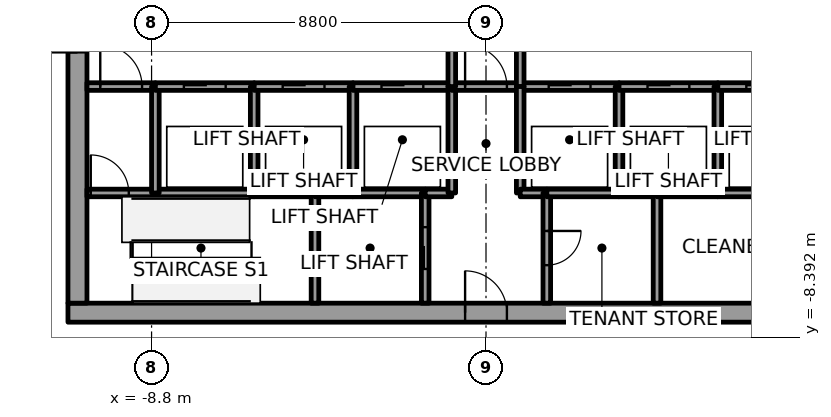
"""IFC4 building model, lengths in metres.
Left out: names, types, materials, properties, quantities, classifications, styles, units other than length and angle.
Written with IfcOpenShell. Run it as: python <this file> out.ifc"""

import sys

from ifc_helpers import new_model, si_unit, direction, frame, frame_2d, origin, place, context, subcontext, project, spatial, rectangle, extrude, element, fill, save


model = new_model("IFC4")
c1 = context("Model", 3, precision=1e-05, world=origin(), true_north=direction((0.0, 1.0)))
c2 = subcontext(c1, "Body", "Model", "MODEL_VIEW")
j1 = project(units=[si_unit("LENGTHUNIT", "METRE"), si_unit("PLANEANGLEUNIT", "RADIAN")], contexts=[c1])
p1 = place(None, origin())
s1 = spatial("IfcSite", under=j1, at=p1, CompositionType="ELEMENT")
p2 = place(p1, origin())
s2 = spatial("IfcBuilding", under=s1, at=p2, CompositionType="ELEMENT")
p3 = place(p2, frame((0.0, 0.0, 197.8)))
s3 = spatial("IfcBuildingStorey", under=s2, at=p3, CompositionType="ELEMENT", Elevation=197.8)
p4 = place(p3, frame((-11.0, -7.75, 0.0), z_axis=(0.0, 0.0, 1.0), x_axis=(1.0, 0.0, 0.0)))
e1 = element("IfcWall", 1, at=p4, inside=s3, PredefinedType="SHEAR", context=c2, shape_type="SweptSolid", body=[
    extrude(rectangle(XDim=22.0, YDim=0.5, at=frame_2d((11.0, 0.0))), origin(), (0.0, 0.0, 1.0), 4.0),
])
p5 = place(p4, frame((10.45, 0.0, 0.0)))
e2 = element("IfcOpeningElement", 2, at=p5, cuts=e1, PredefinedType="OPENING", context=c2, shape_type="SweptSolid", body=[
    extrude(rectangle(XDim=1.1, YDim=2.1, at=frame_2d((0.55, 1.05))), frame((0.0, 0.25, 0.0), z_axis=(0.0, -1.0, 0.0), x_axis=(1.0, 0.0, 0.0)), (0.0, 0.0, 1.0), 0.5),
])
p6 = place(p3, frame((-10.75, -7.5, 0.0), z_axis=(0.0, 0.0, 1.0), x_axis=(0.0, 1.0, 0.0)))
e3 = element("IfcWall", 3, at=p6, inside=s3, PredefinedType="SHEAR", context=c2, shape_type="SweptSolid", body=[
    extrude(rectangle(XDim=15.0, YDim=0.5, at=frame_2d((7.5, 0.0))), origin(), (0.0, 0.0, 1.0), 4.0),
])
p7 = place(p6, frame((6.6, 0.0, 0.0)))
e4 = element("IfcOpeningElement", 4, at=p7, cuts=e3, PredefinedType="OPENING", context=c2, shape_type="SweptSolid", body=[
    extrude(rectangle(XDim=1.8, YDim=2.1, at=frame_2d((0.9, 1.05))), frame((0.0, 0.25, 0.0), z_axis=(0.0, -1.0, 0.0), x_axis=(1.0, 0.0, 0.0)), (0.0, 0.0, 1.0), 0.5),
])
p8 = place(p3, frame((-10.5, -4.6, 0.0), z_axis=(0.0, 0.0, 1.0), x_axis=(1.0, 0.0, 0.0)))
e5 = element("IfcWall", 5, at=p8, inside=s3, PredefinedType="SOLIDWALL", context=c2, shape_type="SweptSolid", body=[
    extrude(rectangle(XDim=1.8, YDim=0.2, at=frame_2d((0.9, 0.0))), origin(), (0.0, 0.0, 1.0), 3.85),
])
p9 = place(p8, frame((0.1, 0.0, 0.0)))
e6 = element("IfcOpeningElement", 6, at=p9, cuts=e5, PredefinedType="OPENING", context=c2, shape_type="SweptSolid", body=[
    extrude(rectangle(XDim=1.0, YDim=2.1, at=frame_2d((0.5, 1.05))), frame((0.0, 0.1, 0.0), z_axis=(0.0, -1.0, 0.0), x_axis=(1.0, 0.0, 0.0)), (0.0, 0.0, 1.0), 0.2),
])
p10 = place(p3, frame((-10.5, -1.8, 0.0), z_axis=(0.0, 0.0, 1.0), x_axis=(1.0, 0.0, 0.0)))
e7 = element("IfcWall", 7, at=p10, inside=s3, PredefinedType="SOLIDWALL", context=c2, shape_type="SweptSolid", body=[
    extrude(rectangle(XDim=1.8, YDim=0.2, at=frame_2d((0.9, 0.0))), origin(), (0.0, 0.0, 1.0), 3.85),
])
p11 = place(p10, frame((0.35, 0.0, 0.0)))
e8 = element("IfcOpeningElement", 8, at=p11, cuts=e7, PredefinedType="OPENING", context=c2, shape_type="SweptSolid", body=[
    extrude(rectangle(XDim=1.1, YDim=2.1, at=frame_2d((0.55, 1.05))), frame((0.0, 0.1, 0.0), z_axis=(0.0, -1.0, 0.0), x_axis=(1.0, 0.0, 0.0)), (0.0, 0.0, 1.0), 0.2),
])
p12 = place(p3, frame((-8.7, -4.6, 0.0), z_axis=(0.0, 0.0, 1.0), x_axis=(1.0, 0.0, 0.0)))
e9 = element("IfcWall", 9, at=p12, inside=s3, PredefinedType="SOLIDWALL", context=c2, shape_type="SweptSolid", body=[
    extrude(rectangle(XDim=2.6, YDim=0.2, at=frame_2d((1.3, 0.0))), origin(), (0.0, 0.0, 1.0), 3.85),
])
p13 = place(p3, frame((-8.7, -4.6, 0.0), z_axis=(0.0, 0.0, 1.0), x_axis=(0.0, 1.0, 0.0)))
e10 = element("IfcWall", 10, at=p13, inside=s3, PredefinedType="SOLIDWALL", context=c2, shape_type="SweptSolid", body=[
    extrude(rectangle(XDim=2.8, YDim=0.2, at=frame_2d((1.4, 0.0))), origin(), (0.0, 0.0, 1.0), 3.85),
])
p14 = place(p3, frame((-8.7, -1.8, 0.0), z_axis=(0.0, 0.0, 1.0), x_axis=(1.0, 0.0, 0.0)))
e11 = element("IfcWall", 11, at=p14, inside=s3, PredefinedType="SOLIDWALL", context=c2, shape_type="SweptSolid", body=[
    extrude(rectangle(XDim=2.6, YDim=0.2, at=frame_2d((1.3, 0.0))), origin(), (0.0, 0.0, 1.0), 3.85),
])
p15 = place(p14, frame((0.75, 0.0, 0.0)))
e12 = element("IfcOpeningElement", 12, at=p15, cuts=e11, PredefinedType="OPENING", context=c2, shape_type="SweptSolid", body=[
    extrude(rectangle(XDim=1.1, YDim=2.1, at=frame_2d((0.55, 1.05))), frame((0.0, 0.1, 0.0), z_axis=(0.0, -1.0, 0.0), x_axis=(1.0, 0.0, 0.0)), (0.0, 0.0, 1.0), 0.2),
])
p16 = place(p3, frame((-6.1, -4.6, 0.0), z_axis=(0.0, 0.0, 1.0), x_axis=(1.0, 0.0, 0.0)))
e13 = element("IfcWall", 13, at=p16, inside=s3, PredefinedType="SOLIDWALL", context=c2, shape_type="SweptSolid", body=[
    extrude(rectangle(XDim=1.6, YDim=0.2, at=frame_2d((0.8, 0.0))), origin(), (0.0, 0.0, 1.0), 3.85),
])
p17 = place(p3, frame((-6.1, -4.6, 0.0), z_axis=(0.0, 0.0, 1.0), x_axis=(0.0, 1.0, 0.0)))
e14 = element("IfcWall", 14, at=p17, inside=s3, PredefinedType="SOLIDWALL", context=c2, shape_type="SweptSolid", body=[
    extrude(rectangle(XDim=2.8, YDim=0.2, at=frame_2d((1.4, 0.0))), origin(), (0.0, 0.0, 1.0), 3.85),
])
p18 = place(p3, frame((-6.1, -1.8, 0.0), z_axis=(0.0, 0.0, 1.0), x_axis=(1.0, 0.0, 0.0)))
e15 = element("IfcWall", 15, at=p18, inside=s3, PredefinedType="SOLIDWALL", context=c2, shape_type="SweptSolid", body=[
    extrude(rectangle(XDim=2.6, YDim=0.2, at=frame_2d((1.3, 0.0))), origin(), (0.0, 0.0, 1.0), 3.85),
])
p19 = place(p18, frame((0.75, 0.0, 0.0)))
e16 = element("IfcOpeningElement", 16, at=p19, cuts=e15, PredefinedType="OPENING", context=c2, shape_type="SweptSolid", body=[
    extrude(rectangle(XDim=1.1, YDim=2.1, at=frame_2d((0.55, 1.05))), frame((0.0, 0.1, 0.0), z_axis=(0.0, -1.0, 0.0), x_axis=(1.0, 0.0, 0.0)), (0.0, 0.0, 1.0), 0.2),
])
p20 = place(p3, frame((-4.5, -4.6, 0.0), z_axis=(0.0, 0.0, 1.0), x_axis=(0.0, -1.0, 0.0)))
e17 = element("IfcWall", 17, at=p20, inside=s3, PredefinedType="SOLIDWALL", context=c2, shape_type="SweptSolid", body=[
    extrude(rectangle(XDim=2.9, YDim=0.2, at=frame_2d((1.45, 0.0))), origin(), (0.0, 0.0, 1.0), 3.85),
])
p21 = place(p3, frame((-4.5, -4.6, 0.0), z_axis=(0.0, 0.0, 1.0), x_axis=(1.0, 0.0, 0.0)))
e18 = element("IfcWall", 18, at=p21, inside=s3, PredefinedType="SOLIDWALL", context=c2, shape_type="SweptSolid", body=[
    extrude(rectangle(XDim=1.0, YDim=0.2, at=frame_2d((0.5, 0.0))), origin(), (0.0, 0.0, 1.0), 3.85),
])
p22 = place(p3, frame((-3.5, -4.6, 0.0), z_axis=(0.0, 0.0, 1.0), x_axis=(1.0, 0.0, 0.0)))
e19 = element("IfcWall", 19, at=p22, inside=s3, PredefinedType="SOLIDWALL", context=c2, shape_type="SweptSolid", body=[
    extrude(rectangle(XDim=1.9, YDim=0.2, at=frame_2d((0.95, 0.0))), origin(), (0.0, 0.0, 1.0), 3.85),
])
p23 = place(p3, frame((-3.5, -4.6, 0.0), z_axis=(0.0, 0.0, 1.0), x_axis=(0.0, 1.0, 0.0)))
e20 = element("IfcWall", 20, at=p23, inside=s3, PredefinedType="SOLIDWALL", context=c2, shape_type="SweptSolid", body=[
    extrude(rectangle(XDim=2.8, YDim=0.2, at=frame_2d((1.4, 0.0))), origin(), (0.0, 0.0, 1.0), 3.85),
])
p24 = place(p3, frame((-3.5, -1.8, 0.0), z_axis=(0.0, 0.0, 1.0), x_axis=(1.0, 0.0, 0.0)))
e21 = element("IfcWall", 21, at=p24, inside=s3, PredefinedType="SOLIDWALL", context=c2, shape_type="SweptSolid", body=[
    extrude(rectangle(XDim=2.6, YDim=0.2, at=frame_2d((1.3, 0.0))), origin(), (0.0, 0.0, 1.0), 3.85),
])
p25 = place(p24, frame((0.75, 0.0, 0.0)))
e22 = element("IfcOpeningElement", 22, at=p25, cuts=e21, PredefinedType="OPENING", context=c2, shape_type="SweptSolid", body=[
    extrude(rectangle(XDim=1.1, YDim=2.1, at=frame_2d((0.55, 1.05))), frame((0.0, 0.1, 0.0), z_axis=(0.0, -1.0, 0.0), x_axis=(1.0, 0.0, 0.0)), (0.0, 0.0, 1.0), 0.2),
])
p26 = place(p3, frame((-1.6, -7.5, 0.0), z_axis=(0.0, 0.0, 1.0), x_axis=(0.0, 1.0, 0.0)))
e23 = element("IfcWall", 23, at=p26, inside=s3, PredefinedType="SOLIDWALL", context=c2, shape_type="SweptSolid", body=[
    extrude(rectangle(XDim=2.9, YDim=0.2, at=frame_2d((1.45, 0.0))), origin(), (0.0, 0.0, 1.0), 3.85),
])
p27 = place(p26, frame((0.9, 0.0, 0.0)))
e24 = element("IfcOpeningElement", 24, at=p27, cuts=e23, PredefinedType="OPENING", context=c2, shape_type="SweptSolid", body=[
    extrude(rectangle(XDim=1.1, YDim=2.1, at=frame_2d((0.55, 1.05))), frame((0.0, 0.1, 0.0), z_axis=(0.0, -1.0, 0.0), x_axis=(1.0, 0.0, 0.0)), (0.0, 0.0, 1.0), 0.2),
])
p28 = place(p3, frame((-1.6, -4.6, 0.0), z_axis=(0.0, 0.0, 1.0), x_axis=(1.0, 0.0, 0.0)))
e25 = element("IfcWall", 25, at=p28, inside=s3, PredefinedType="SOLIDWALL", context=c2, shape_type="SweptSolid", body=[
    extrude(rectangle(XDim=0.7, YDim=0.2, at=frame_2d((0.35, 0.0))), origin(), (0.0, 0.0, 1.0), 3.85),
])
p29 = place(p3, frame((-0.9, -4.6, 0.0), z_axis=(0.0, 0.0, 1.0), x_axis=(0.0, 1.0, 0.0)))
e26 = element("IfcWall", 26, at=p29, inside=s3, PredefinedType="SOLIDWALL", context=c2, shape_type="SweptSolid", body=[
    extrude(rectangle(XDim=2.8, YDim=0.2, at=frame_2d((1.4, 0.0))), origin(), (0.0, 0.0, 1.0), 3.85),
])
p30 = place(p3, frame((-0.9, -1.8, 0.0), z_axis=(0.0, 0.0, 1.0), x_axis=(1.0, 0.0, 0.0)))
e27 = element("IfcWall", 27, at=p30, inside=s3, PredefinedType="SOLIDWALL", context=c2, shape_type="SweptSolid", body=[
    extrude(rectangle(XDim=1.8, YDim=0.2, at=frame_2d((0.9, 0.0))), origin(), (0.0, 0.0, 1.0), 3.85),
])
p31 = place(p30, frame((0.35, 0.0, 0.0)))
e28 = element("IfcOpeningElement", 28, at=p31, cuts=e27, PredefinedType="OPENING", context=c2, shape_type="SweptSolid", body=[
    extrude(rectangle(XDim=1.1, YDim=2.1, at=frame_2d((0.55, 1.05))), frame((0.0, 0.1, 0.0), z_axis=(0.0, -1.0, 0.0), x_axis=(1.0, 0.0, 0.0)), (0.0, 0.0, 1.0), 0.2),
])
p32 = place(p3, frame((-0.9, 1.8, 0.0), z_axis=(0.0, 0.0, 1.0), x_axis=(0.0, -1.0, 0.0)))
e29 = element("IfcWall", 29, at=p32, inside=s3, PredefinedType="SOLIDWALL", context=c2, shape_type="SweptSolid", body=[
    extrude(rectangle(XDim=3.6, YDim=0.2, at=frame_2d((1.8, 0.0))), origin(), (0.0, 0.0, 1.0), 3.85),
])
p33 = place(p32, frame((1.05, 0.0, 0.0)))
e30 = element("IfcOpeningElement", 30, at=p33, cuts=e29, PredefinedType="OPENING", context=c2, shape_type="SweptSolid", body=[
    extrude(rectangle(XDim=1.5, YDim=2.1, at=frame_2d((0.75, 1.05))), frame((0.0, 0.1, 0.0), z_axis=(0.0, -1.0, 0.0), x_axis=(1.0, 0.0, 0.0)), (0.0, 0.0, 1.0), 0.2),
])
p34 = place(p3, frame((0.9, -1.8, 0.0), z_axis=(0.0, 0.0, 1.0), x_axis=(1.0, 0.0, 0.0)))
e31 = element("IfcWall", 31, at=p34, inside=s3, PredefinedType="SOLIDWALL", context=c2, shape_type="SweptSolid", body=[
    extrude(rectangle(XDim=2.6, YDim=0.2, at=frame_2d((1.3, 0.0))), origin(), (0.0, 0.0, 1.0), 3.85),
])
p35 = place(p34, frame((0.75, 0.0, 0.0)))
e32 = element("IfcOpeningElement", 32, at=p35, cuts=e31, PredefinedType="OPENING", context=c2, shape_type="SweptSolid", body=[
    extrude(rectangle(XDim=1.1, YDim=2.1, at=frame_2d((0.55, 1.05))), frame((0.0, 0.1, 0.0), z_axis=(0.0, -1.0, 0.0), x_axis=(1.0, 0.0, 0.0)), (0.0, 0.0, 1.0), 0.2),
])
p36 = place(p3, frame((0.9, -1.8, 0.0), z_axis=(0.0, 0.0, 1.0), x_axis=(0.0, 1.0, 0.0)))
e33 = element("IfcWall", 33, at=p36, inside=s3, PredefinedType="SOLIDWALL", context=c2, shape_type="SweptSolid", body=[
    extrude(rectangle(XDim=3.6, YDim=0.2, at=frame_2d((1.8, 0.0))), origin(), (0.0, 0.0, 1.0), 3.85),
])
p37 = place(p36, frame((1.05, 0.0, 0.0)))
e34 = element("IfcOpeningElement", 34, at=p37, cuts=e33, PredefinedType="OPENING", context=c2, shape_type="SweptSolid", body=[
    extrude(rectangle(XDim=1.5, YDim=2.1, at=frame_2d((0.75, 1.05))), frame((0.0, 0.1, 0.0), z_axis=(0.0, -1.0, 0.0), x_axis=(1.0, 0.0, 0.0)), (0.0, 0.0, 1.0), 0.2),
])
p38 = place(p3, frame((0.9, -1.8, 0.0), z_axis=(0.0, 0.0, 1.0), x_axis=(0.0, -1.0, 0.0)))
e35 = element("IfcWall", 35, at=p38, inside=s3, PredefinedType="SOLIDWALL", context=c2, shape_type="SweptSolid", body=[
    extrude(rectangle(XDim=2.8, YDim=0.2, at=frame_2d((1.4, 0.0))), origin(), (0.0, 0.0, 1.0), 3.85),
])
p39 = place(p3, frame((0.9, -4.6, 0.0), z_axis=(0.0, 0.0, 1.0), x_axis=(1.0, 0.0, 0.0)))
e36 = element("IfcWall", 36, at=p39, inside=s3, PredefinedType="SOLIDWALL", context=c2, shape_type="SweptSolid", body=[
    extrude(rectangle(XDim=0.7, YDim=0.2, at=frame_2d((0.35, 0.0))), origin(), (0.0, 0.0, 1.0), 3.85),
])
p40 = place(p3, frame((1.6, -4.6, 0.0), z_axis=(0.0, 0.0, 1.0), x_axis=(0.0, -1.0, 0.0)))
e37 = element("IfcWall", 37, at=p40, inside=s3, PredefinedType="SOLIDWALL", context=c2, shape_type="SweptSolid", body=[
    extrude(rectangle(XDim=2.9, YDim=0.2, at=frame_2d((1.45, 0.0))), origin(), (0.0, 0.0, 1.0), 3.85),
])
p41 = place(p40, frame((1.0, 0.0, 0.0)))
e38 = element("IfcOpeningElement", 38, at=p41, cuts=e37, PredefinedType="OPENING", context=c2, shape_type="SweptSolid", body=[
    extrude(rectangle(XDim=0.9, YDim=2.1, at=frame_2d((0.45, 1.05))), frame((0.0, 0.1, 0.0), z_axis=(0.0, -1.0, 0.0), x_axis=(1.0, 0.0, 0.0)), (0.0, 0.0, 1.0), 0.2),
])
p42 = place(p3, frame((3.5, -4.6, 0.0), z_axis=(0.0, 0.0, 1.0), x_axis=(-1.0, 0.0, 0.0)))
e39 = element("IfcWall", 39, at=p42, inside=s3, PredefinedType="SOLIDWALL", context=c2, shape_type="SweptSolid", body=[
    extrude(rectangle(XDim=1.9, YDim=0.2, at=frame_2d((0.95, 0.0))), origin(), (0.0, 0.0, 1.0), 3.85),
])
p43 = place(p3, frame((4.5, -4.6, 0.0), z_axis=(0.0, 0.0, 1.0), x_axis=(-1.0, 0.0, 0.0)))
e40 = element("IfcWall", 40, at=p43, inside=s3, PredefinedType="SOLIDWALL", context=c2, shape_type="SweptSolid", body=[
    extrude(rectangle(XDim=1.0, YDim=0.2, at=frame_2d((0.5, 0.0))), origin(), (0.0, 0.0, 1.0), 3.85),
])
p44 = place(p3, frame((3.5, -4.6, 0.0), z_axis=(0.0, 0.0, 1.0), x_axis=(0.0, 1.0, 0.0)))
e41 = element("IfcWall", 41, at=p44, inside=s3, PredefinedType="SOLIDWALL", context=c2, shape_type="SweptSolid", body=[
    extrude(rectangle(XDim=2.8, YDim=0.2, at=frame_2d((1.4, 0.0))), origin(), (0.0, 0.0, 1.0), 3.85),
])
p45 = place(p3, frame((3.5, -1.8, 0.0), z_axis=(0.0, 0.0, 1.0), x_axis=(1.0, 0.0, 0.0)))
e42 = element("IfcWall", 42, at=p45, inside=s3, PredefinedType="SOLIDWALL", context=c2, shape_type="SweptSolid", body=[
    extrude(rectangle(XDim=2.6, YDim=0.2, at=frame_2d((1.3, 0.0))), origin(), (0.0, 0.0, 1.0), 3.85),
])
p46 = place(p45, frame((0.75, 0.0, 0.0)))
e43 = element("IfcOpeningElement", 43, at=p46, cuts=e42, PredefinedType="OPENING", context=c2, shape_type="SweptSolid", body=[
    extrude(rectangle(XDim=1.1, YDim=2.1, at=frame_2d((0.55, 1.05))), frame((0.0, 0.1, 0.0), z_axis=(0.0, -1.0, 0.0), x_axis=(1.0, 0.0, 0.0)), (0.0, 0.0, 1.0), 0.2),
])
p47 = place(p3, frame((4.5, -4.6, 0.0), z_axis=(0.0, 0.0, 1.0), x_axis=(0.0, -1.0, 0.0)))
e44 = element("IfcWall", 44, at=p47, inside=s3, PredefinedType="SOLIDWALL", context=c2, shape_type="SweptSolid", body=[
    extrude(rectangle(XDim=2.9, YDim=0.2, at=frame_2d((1.45, 0.0))), origin(), (0.0, 0.0, 1.0), 3.85),
])
p48 = place(p3, frame((6.1, -4.6, 0.0), z_axis=(0.0, 0.0, 1.0), x_axis=(-1.0, 0.0, 0.0)))
e45 = element("IfcWall", 45, at=p48, inside=s3, PredefinedType="SOLIDWALL", context=c2, shape_type="SweptSolid", body=[
    extrude(rectangle(XDim=1.6, YDim=0.2, at=frame_2d((0.8, 0.0))), origin(), (0.0, 0.0, 1.0), 3.85),
])
p49 = place(p3, frame((8.7, -4.6, 0.0), z_axis=(0.0, 0.0, 1.0), x_axis=(-1.0, 0.0, 0.0)))
e46 = element("IfcWall", 46, at=p49, inside=s3, PredefinedType="SOLIDWALL", context=c2, shape_type="SweptSolid", body=[
    extrude(rectangle(XDim=2.6, YDim=0.2, at=frame_2d((1.3, 0.0))), origin(), (0.0, 0.0, 1.0), 3.85),
])
p50 = place(p3, frame((6.1, -4.6, 0.0), z_axis=(0.0, 0.0, 1.0), x_axis=(0.0, 1.0, 0.0)))
e47 = element("IfcWall", 47, at=p50, inside=s3, PredefinedType="SOLIDWALL", context=c2, shape_type="SweptSolid", body=[
    extrude(rectangle(XDim=2.8, YDim=0.2, at=frame_2d((1.4, 0.0))), origin(), (0.0, 0.0, 1.0), 3.85),
])
p51 = place(p3, frame((6.1, -1.8, 0.0), z_axis=(0.0, 0.0, 1.0), x_axis=(1.0, 0.0, 0.0)))
e48 = element("IfcWall", 48, at=p51, inside=s3, PredefinedType="SOLIDWALL", context=c2, shape_type="SweptSolid", body=[
    extrude(rectangle(XDim=2.6, YDim=0.2, at=frame_2d((1.3, 0.0))), origin(), (0.0, 0.0, 1.0), 3.85),
])
p52 = place(p51, frame((0.75, 0.0, 0.0)))
e49 = element("IfcOpeningElement", 49, at=p52, cuts=e48, PredefinedType="OPENING", context=c2, shape_type="SweptSolid", body=[
    extrude(rectangle(XDim=1.1, YDim=2.1, at=frame_2d((0.55, 1.05))), frame((0.0, 0.1, 0.0), z_axis=(0.0, -1.0, 0.0), x_axis=(1.0, 0.0, 0.0)), (0.0, 0.0, 1.0), 0.2),
])
p53 = place(p15, origin())
e50 = element("IfcDoor", 50, at=p53, inside=s3, OperationType="SLIDING_TO_RIGHT", PredefinedType="DOOR", context=c2, shape_type="SweptSolid", body=[
    extrude(rectangle(XDim=1.1, YDim=2.1, at=frame_2d((0.55, 1.05))), frame((0.0, 0.025, 0.0), z_axis=(0.0, -1.0, 0.0), x_axis=(1.0, 0.0, 0.0)), (0.0, 0.0, 1.0), 0.05),
])
fill(e12, e50)
p54 = place(p19, origin())
e51 = element("IfcDoor", 51, at=p54, inside=s3, OperationType="SLIDING_TO_LEFT", PredefinedType="DOOR", context=c2, shape_type="SweptSolid", body=[
    extrude(rectangle(XDim=1.1, YDim=2.1, at=frame_2d((0.55, 1.05))), frame((0.0, 0.025, 0.0), z_axis=(0.0, -1.0, 0.0), x_axis=(1.0, 0.0, 0.0)), (0.0, 0.0, 1.0), 0.05),
])
fill(e16, e51)
p55 = place(p25, origin())
e52 = element("IfcDoor", 52, at=p55, inside=s3, OperationType="SLIDING_TO_RIGHT", PredefinedType="DOOR", context=c2, shape_type="SweptSolid", body=[
    extrude(rectangle(XDim=1.1, YDim=2.1, at=frame_2d((0.55, 1.05))), frame((0.0, 0.025, 0.0), z_axis=(0.0, -1.0, 0.0), x_axis=(1.0, 0.0, 0.0)), (0.0, 0.0, 1.0), 0.05),
])
fill(e22, e52)
p56 = place(p35, origin())
e53 = element("IfcDoor", 53, at=p56, inside=s3, OperationType="SLIDING_TO_LEFT", PredefinedType="DOOR", context=c2, shape_type="SweptSolid", body=[
    extrude(rectangle(XDim=1.1, YDim=2.1, at=frame_2d((0.55, 1.05))), frame((0.0, 0.025, 0.0), z_axis=(0.0, -1.0, 0.0), x_axis=(1.0, 0.0, 0.0)), (0.0, 0.0, 1.0), 0.05),
])
fill(e32, e53)
p57 = place(p46, origin())
e54 = element("IfcDoor", 54, at=p57, inside=s3, OperationType="SLIDING_TO_LEFT", PredefinedType="DOOR", context=c2, shape_type="SweptSolid", body=[
    extrude(rectangle(XDim=1.1, YDim=2.1, at=frame_2d((0.55, 1.05))), frame((0.0, 0.025, 0.0), z_axis=(0.0, -1.0, 0.0), x_axis=(1.0, 0.0, 0.0)), (0.0, 0.0, 1.0), 0.05),
])
fill(e43, e54)
p58 = place(p52, origin())
e55 = element("IfcDoor", 55, at=p58, inside=s3, OperationType="SLIDING_TO_LEFT", PredefinedType="DOOR", context=c2, shape_type="SweptSolid", body=[
    extrude(rectangle(XDim=1.1, YDim=2.1, at=frame_2d((0.55, 1.05))), frame((0.0, 0.025, 0.0), z_axis=(0.0, -1.0, 0.0), x_axis=(1.0, 0.0, 0.0)), (0.0, 0.0, 1.0), 0.05),
])
fill(e49, e55)
p59 = place(p27, origin())
e56 = element("IfcDoor", 56, at=p59, inside=s3, OperationType="SLIDING_TO_LEFT", PredefinedType="DOOR", context=c2, shape_type="SweptSolid", body=[
    extrude(rectangle(XDim=1.1, YDim=2.1, at=frame_2d((0.55, 1.05))), frame((0.0, 0.025, 0.0), z_axis=(0.0, -1.0, 0.0), x_axis=(1.0, 0.0, 0.0)), (0.0, 0.0, 1.0), 0.05),
])
fill(e24, e56)
p60 = place(p11, origin())
e57 = element("IfcDoor", 57, at=p60, inside=s3, OperationType="SINGLE_SWING_RIGHT", PredefinedType="DOOR", context=c2, shape_type="SweptSolid", body=[
    extrude(rectangle(XDim=1.1, YDim=2.1, at=frame_2d((0.55, 1.05))), frame((0.0, 0.025, 0.0), z_axis=(0.0, -1.0, 0.0), x_axis=(1.0, 0.0, 0.0)), (0.0, 0.0, 1.0), 0.05),
])
fill(e8, e57)
p61 = place(p31, origin())
e58 = element("IfcDoor", 58, at=p61, inside=s3, OperationType="SINGLE_SWING_RIGHT", PredefinedType="DOOR", context=c2, shape_type="SweptSolid", body=[
    extrude(rectangle(XDim=1.1, YDim=2.1, at=frame_2d((0.55, 1.05))), frame((0.0, 0.025, 0.0), z_axis=(0.0, -1.0, 0.0), x_axis=(1.0, 0.0, 0.0)), (0.0, 0.0, 1.0), 0.05),
])
fill(e28, e58)
p62 = place(p9, origin())
e59 = element("IfcDoor", 59, at=p62, inside=s3, OperationType="SINGLE_SWING_LEFT", PredefinedType="DOOR", context=c2, shape_type="SweptSolid", body=[
    extrude(rectangle(XDim=1.0, YDim=2.1, at=frame_2d((0.5, 1.05))), frame((0.0, 0.025, 0.0), z_axis=(0.0, -1.0, 0.0), x_axis=(1.0, 0.0, 0.0)), (0.0, 0.0, 1.0), 0.05),
])
fill(e6, e59)
p63 = place(p41, origin())
e60 = element("IfcDoor", 60, at=p63, inside=s3, OperationType="SINGLE_SWING_LEFT", PredefinedType="DOOR", context=c2, shape_type="SweptSolid", body=[
    extrude(rectangle(XDim=0.9, YDim=2.1, at=frame_2d((0.45, 1.05))), frame((0.0, 0.025, 0.0), z_axis=(0.0, -1.0, 0.0), x_axis=(1.0, 0.0, 0.0)), (0.0, 0.0, 1.0), 0.05),
])
fill(e38, e60)
p64 = place(p7, origin())
e61 = element("IfcDoor", 61, at=p64, inside=s3, OperationType="DOUBLE_DOOR_SINGLE_SWING", PredefinedType="DOOR", context=c2, shape_type="SweptSolid", body=[
    extrude(rectangle(XDim=1.8, YDim=2.1, at=frame_2d((0.9, 1.05))), frame((0.0, 0.025, 0.0), z_axis=(0.0, -1.0, 0.0), x_axis=(1.0, 0.0, 0.0)), (0.0, 0.0, 1.0), 0.05),
])
fill(e4, e61)
p65 = place(p5, origin())
e62 = element("IfcDoor", 62, at=p65, inside=s3, OperationType="SINGLE_SWING_RIGHT", PredefinedType="DOOR", context=c2, shape_type="SweptSolid", body=[
    extrude(rectangle(XDim=1.1, YDim=2.1, at=frame_2d((0.55, 1.05))), frame((0.0, 0.025, 0.0), z_axis=(0.0, -1.0, 0.0), x_axis=(1.0, 0.0, 0.0)), (0.0, 0.0, 1.0), 0.05),
])
fill(e2, e62)
save(model, sys.argv[1])
